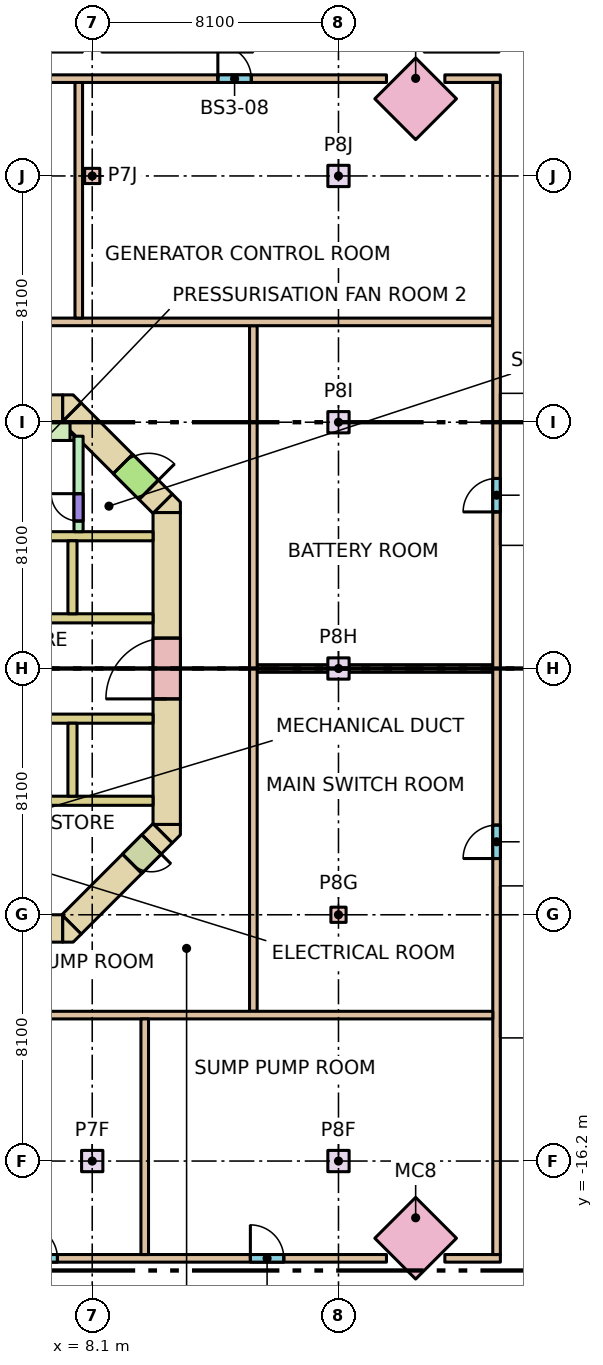
"""IFC4 building model, lengths in metres.
Left out: names, types, materials, properties, quantities, classifications, styles, units other than length and angle.
Written with IfcOpenShell. Run it as: python <this file> out.ifc"""

import sys

from ifc_helpers import new_model, si_unit, direction, frame, frame_2d, origin, origin_2d, place, context, subcontext, project, spatial, polyline, rectangle, outline, extrude, element, fill, save


model = new_model("IFC4")
c1 = context("Model", 3, precision=1e-05, world=origin(), true_north=direction((0.0, 1.0)))
c2 = subcontext(c1, "Body", "Model", "MODEL_VIEW")
j1 = project(units=[si_unit("LENGTHUNIT", "METRE"), si_unit("PLANEANGLEUNIT", "RADIAN")], contexts=[c1])
p1 = place(None, origin())
s1 = spatial("IfcSite", under=j1, at=p1, CompositionType="ELEMENT")
p2 = place(p1, origin())
s2 = spatial("IfcBuilding", under=s1, at=p2, CompositionType="ELEMENT")
p3 = place(p2, frame((0.0, 0.0, -10.8)))
s3 = spatial("IfcBuildingStorey", under=s2, at=p3, CompositionType="ELEMENT", Elevation=-10.8)
p4 = place(p3, frame((8.1, -16.2, 0.0), z_axis=(0.0, 0.0, 1.0), x_axis=(1.0, 0.0, 0.0)))
e1 = element("IfcColumn", 1, at=p4, inside=s3, PredefinedType="COLUMN", context=c2, shape_type="SweptSolid", body=[
    extrude(rectangle(XDim=0.7, YDim=0.7, at=origin_2d()), origin(), (0.0, 0.0, 1.0), 3.6),
])
p5 = place(p3, frame((8.1, 16.2, 0.0), z_axis=(0.0, 0.0, 1.0), x_axis=(1.0, 0.0, 0.0)))
e2 = element("IfcColumn", 2, at=p5, inside=s3, PredefinedType="COLUMN", context=c2, shape_type="SweptSolid", body=[
    extrude(rectangle(XDim=0.5, YDim=0.5, at=origin_2d()), origin(), (0.0, 0.0, 1.0), 3.6),
])
p6 = place(p3, frame((16.2, -16.2, 0.0), z_axis=(0.0, 0.0, 1.0), x_axis=(1.0, 0.0, 0.0)))
e3 = element("IfcColumn", 3, at=p6, inside=s3, PredefinedType="COLUMN", context=c2, shape_type="SweptSolid", body=[
    extrude(rectangle(XDim=0.7, YDim=0.7, at=origin_2d()), origin(), (0.0, 0.0, 1.0), 3.6),
])
p7 = place(p3, frame((16.2, -8.1, 0.0), z_axis=(0.0, 0.0, 1.0), x_axis=(1.0, 0.0, 0.0)))
e4 = element("IfcColumn", 4, at=p7, inside=s3, PredefinedType="COLUMN", context=c2, shape_type="SweptSolid", body=[
    extrude(rectangle(XDim=0.5, YDim=0.5, at=origin_2d()), origin(), (0.0, 0.0, 1.0), 3.6),
])
for number, where, z_axis, x_axis in (
    (5, (16.2, 0.0, 0.0), (0.0, 0.0, 1.0), (1.0, 0.0, 0.0)),
    (6, (16.2, 8.1, 0.0), (0.0, 0.0, 1.0), (1.0, 0.0, 0.0)),
    (7, (16.2, 16.2, 0.0), (0.0, 0.0, 1.0), (1.0, 0.0, 0.0)),
):
    element("IfcColumn", number, at=place(p3, frame(where, z_axis=z_axis, x_axis=x_axis)), inside=s3, PredefinedType="COLUMN", context=c2, shape_type="SweptSolid", body=[
        extrude(rectangle(XDim=0.7, YDim=0.7, at=origin_2d()), origin(), (0.0, 0.0, 1.0), 3.6),
    ])
for number, where, z_axis, x_axis in (
    (8, (18.738, 18.738, 0.0), (0.0, 0.0, 1.0), (-0.707, 0.707, 0.0)),
    (9, (18.738, -18.738, 0.0), (0.0, 0.0, 1.0), (0.707, 0.707, 0.0)),
):
    element("IfcColumn", number, at=place(p3, frame(where, z_axis=z_axis, x_axis=x_axis)), inside=s3, PredefinedType="COLUMN", context=c2, shape_type="SweptSolid", body=[
        extrude(rectangle(XDim=1.9, YDim=1.9, at=origin_2d()), origin(), (0.0, 0.0, 1.0), 3.6),
    ])
p8 = place(p3, frame((-7.13, 8.55, 0.0), z_axis=(0.0, 0.0, 1.0), x_axis=(1.0, 0.0, 0.0)))
e10 = element("IfcWall", 10, at=p8, inside=s3, PredefinedType="SHEAR", context=c2, shape_type="SweptSolid", body=[
    extrude(rectangle(XDim=14.26, YDim=0.9, at=frame_2d((7.13, 0.0))), origin(), (0.0, 0.0, 1.0), 3.28),
])
p9 = place(p8, frame((5.48, 0.0, 0.0)))
e11 = element("IfcOpeningElement", 11, at=p9, cuts=e10, PredefinedType="OPENING", context=c2, shape_type="SweptSolid", body=[
    extrude(rectangle(XDim=0.7, YDim=2.1, at=frame_2d((0.35, 1.05))), frame((0.0, 0.46, 0.0), z_axis=(0.0, -1.0, 0.0), x_axis=(1.0, 0.0, 0.0)), (0.0, 0.0, 1.0), 0.92),
])
p10 = place(p8, frame((7.155, 0.0, 0.0)))
e12 = element("IfcOpeningElement", 12, at=p10, cuts=e10, PredefinedType="OPENING", context=c2, shape_type="SweptSolid", body=[
    extrude(rectangle(XDim=0.9, YDim=2.1, at=frame_2d((0.45, 1.05))), frame((0.0, 0.46, 0.0), z_axis=(0.0, -1.0, 0.0), x_axis=(1.0, 0.0, 0.0)), (0.0, 0.0, 1.0), 0.92),
])
p11 = place(p3, frame((-7.13, -8.55, 0.0), z_axis=(0.0, 0.0, 1.0), x_axis=(1.0, 0.0, 0.0)))
e13 = element("IfcWall", 13, at=p11, inside=s3, PredefinedType="SHEAR", context=c2, shape_type="SweptSolid", body=[
    extrude(rectangle(XDim=14.26, YDim=0.9, at=frame_2d((7.13, 0.0))), origin(), (0.0, 0.0, 1.0), 3.28),
])
p12 = place(p11, frame((8.08, 0.0, 0.0)))
e14 = element("IfcOpeningElement", 14, at=p12, cuts=e13, PredefinedType="OPENING", context=c2, shape_type="SweptSolid", body=[
    extrude(rectangle(XDim=0.7, YDim=2.1, at=frame_2d((0.35, 1.05))), frame((0.0, 0.46, 0.0), z_axis=(0.0, -1.0, 0.0), x_axis=(1.0, 0.0, 0.0)), (0.0, 0.0, 1.0), 0.92),
])
p13 = place(p11, frame((6.205, 0.0, 0.0)))
e15 = element("IfcOpeningElement", 15, at=p13, cuts=e13, PredefinedType="OPENING", context=c2, shape_type="SweptSolid", body=[
    extrude(rectangle(XDim=0.9, YDim=2.1, at=frame_2d((0.45, 1.05))), frame((0.0, 0.46, 0.0), z_axis=(0.0, -1.0, 0.0), x_axis=(1.0, 0.0, 0.0)), (0.0, 0.0, 1.0), 0.92),
])
p14 = place(p11, frame((10.667, 0.0, 0.0)))
e16 = element("IfcOpeningElement", 16, at=p14, cuts=e13, PredefinedType="OPENING", context=c2, shape_type="SweptSolid", body=[
    extrude(rectangle(XDim=0.9, YDim=2.1, at=frame_2d((0.45, 1.05))), frame((0.0, 0.46, 0.0), z_axis=(0.0, -1.0, 0.0), x_axis=(1.0, 0.0, 0.0)), (0.0, 0.0, 1.0), 0.92),
])
p15 = place(p3, frame((10.55, -5.13, 0.0), z_axis=(0.0, 0.0, 1.0), x_axis=(0.0, 1.0, 0.0)))
e17 = element("IfcWall", 17, at=p15, inside=s3, PredefinedType="SHEAR", context=c2, shape_type="SweptSolid", body=[
    extrude(rectangle(XDim=10.26, YDim=0.9, at=frame_2d((5.13, 0.0))), origin(), (0.0, 0.0, 1.0), 3.28),
])
p16 = place(p15, frame((4.13, 0.0, 0.0)))
e18 = element("IfcOpeningElement", 18, at=p16, cuts=e17, PredefinedType="OPENING", context=c2, shape_type="SweptSolid", body=[
    extrude(rectangle(XDim=2.0, YDim=2.1, at=frame_2d((1.0, 1.05))), frame((0.0, 0.46, 0.0), z_axis=(0.0, -1.0, 0.0), x_axis=(1.0, 0.0, 0.0)), (0.0, 0.0, 1.0), 0.92),
])
p17 = place(p3, frame((7.418, 8.418, 0.0), z_axis=(0.0, 0.0, 1.0), x_axis=(0.707106781187, -0.707106781187, 0.0)))
e19 = element("IfcWall", 19, at=p17, inside=s3, PredefinedType="SHEAR", context=c2, shape_type="SweptSolid", body=[
    extrude(rectangle(XDim=4.243, YDim=0.9, at=frame_2d((2.121, 0.0))), origin(), (0.0, 0.0, 1.0), 3.28),
])
p18 = place(p17, frame((2.393, 0.0, 0.0)))
e20 = element("IfcOpeningElement", 20, at=p18, cuts=e19, PredefinedType="OPENING", context=c2, shape_type="SweptSolid", body=[
    extrude(rectangle(XDim=1.2, YDim=2.1, at=frame_2d((0.6, 1.05))), frame((0.0, 0.46, 0.0), z_axis=(0.0, -1.0, 0.0), x_axis=(1.0, 0.0, 0.0)), (0.0, 0.0, 1.0), 0.92),
])
p19 = place(p3, frame((10.418, -5.418, 0.0), z_axis=(0.0, 0.0, 1.0), x_axis=(-0.707106781187, -0.707106781187, 0.0)))
e21 = element("IfcWall", 21, at=p19, inside=s3, PredefinedType="SHEAR", context=c2, shape_type="SweptSolid", body=[
    extrude(rectangle(XDim=4.243, YDim=0.9, at=frame_2d((2.121, 0.0))), origin(), (0.0, 0.0, 1.0), 3.28),
])
p20 = place(p19, frame((0.52, 0.0, 0.0)))
e22 = element("IfcOpeningElement", 22, at=p20, cuts=e21, PredefinedType="OPENING", context=c2, shape_type="SweptSolid", body=[
    extrude(rectangle(XDim=0.9, YDim=2.1, at=frame_2d((0.45, 1.05))), frame((0.0, 0.46, 0.0), z_axis=(0.0, -1.0, 0.0), x_axis=(1.0, 0.0, 0.0)), (0.0, 0.0, 1.0), 0.92),
])
p21 = place(p3, origin())
e23 = element("IfcWall", 23, at=p21, inside=s3, PredefinedType="SHEAR", context=c2, shape_type="SweptSolid", body=[
    extrude(outline(polyline([(7.473, -9.0), (7.13, -9.0), (7.13, -8.13), (7.736, -8.736), (7.473, -9.0)])), origin(), (0.0, 0.0, 1.0), 3.28),
])
p22 = place(p3, origin())
e24 = element("IfcWall", 24, at=p22, inside=s3, PredefinedType="SHEAR", context=c2, shape_type="SweptSolid", body=[
    extrude(outline(polyline([(11.0, -5.473), (10.736, -5.736), (10.13, -5.13), (11.0, -5.13), (11.0, -5.473)])), origin(), (0.0, 0.0, 1.0), 3.28),
])
p23 = place(p3, origin())
e25 = element("IfcWall", 25, at=p23, inside=s3, PredefinedType="SHEAR", context=c2, shape_type="SweptSolid", body=[
    extrude(outline(polyline([(11.0, 5.473), (11.0, 5.13), (10.13, 5.13), (10.736, 5.736), (11.0, 5.473)])), origin(), (0.0, 0.0, 1.0), 3.28),
])
p24 = place(p3, origin())
e26 = element("IfcWall", 26, at=p24, inside=s3, PredefinedType="SHEAR", context=c2, shape_type="SweptSolid", body=[
    extrude(outline(polyline([(7.473, 9.0), (7.736, 8.736), (7.13, 8.13), (7.13, 9.0), (7.473, 9.0)])), origin(), (0.0, 0.0, 1.0), 3.28),
])
for number, where, z_axis, x_axis in (
    (27, (2.0, 4.35, 0.0), (0.0, 0.0, 1.0), (1.0, 0.0, 0.0)),
    (28, (2.0, -4.35, 0.0), (0.0, 0.0, 1.0), (1.0, 0.0, 0.0)),
    (29, (2.0, 1.65, 0.0), (0.0, 0.0, 1.0), (1.0, 0.0, 0.0)),
    (30, (2.0, -1.65, 0.0), (0.0, 0.0, 1.0), (1.0, 0.0, 0.0)),
):
    element("IfcWall", number, at=place(p3, frame(where, z_axis=z_axis, x_axis=x_axis)), inside=s3, PredefinedType="SOLIDWALL", context=c2, shape_type="SweptSolid", body=[
        extrude(rectangle(XDim=8.1, YDim=0.3, at=frame_2d((4.05, 0.0))), origin(), (0.0, 0.0, 1.0), 3.28),
    ])
for number, where, z_axis, x_axis in (
    (31, (7.45, 1.8, 0.0), (0.0, 0.0, 1.0), (0.0, 1.0, 0.0)),
    (32, (7.45, -4.2, 0.0), (0.0, 0.0, 1.0), (0.0, 1.0, 0.0)),
):
    element("IfcWall", number, at=place(p3, frame(where, z_axis=z_axis, x_axis=x_axis)), inside=s3, PredefinedType="SOLIDWALL", context=c2, shape_type="SweptSolid", body=[
        extrude(rectangle(XDim=2.4, YDim=0.3, at=frame_2d((1.2, 0.0))), origin(), (0.0, 0.0, 1.0), 3.28),
    ])
p25 = place(p3, frame((7.65, 4.5, 0.0), z_axis=(0.0, 0.0, 1.0), x_axis=(0.0, 1.0, 0.0)))
e33 = element("IfcWall", 33, at=p25, inside=s3, PredefinedType="SHEAR", context=c2, shape_type="SweptSolid", body=[
    extrude(rectangle(XDim=3.14, YDim=0.3, at=frame_2d((1.57, 0.0))), origin(), (0.0, 0.0, 1.0), 3.28),
])
p26 = place(p25, frame((0.35, 0.0, 0.0)))
e34 = element("IfcOpeningElement", 34, at=p26, cuts=e33, PredefinedType="OPENING", context=c2, shape_type="SweptSolid", body=[
    extrude(rectangle(XDim=0.9, YDim=2.1, at=frame_2d((0.45, 1.05))), frame((0.0, 0.16, 0.0), z_axis=(0.0, -1.0, 0.0), x_axis=(1.0, 0.0, 0.0)), (0.0, 0.0, 1.0), 0.32),
])
p27 = place(p3, frame((2.0, 7.8, 0.0), z_axis=(0.0, 0.0, 1.0), x_axis=(1.0, 0.0, 0.0)))
e35 = element("IfcWall", 35, at=p27, inside=s3, PredefinedType="SHEAR", context=c2, shape_type="SweptSolid", body=[
    extrude(rectangle(XDim=5.37, YDim=0.6, at=frame_2d((2.685, 0.0))), origin(), (0.0, 0.0, 1.0), 3.28),
])
p28 = place(p3, frame((6.9, 7.6, 0.0), z_axis=(0.0, 0.0, 1.0), x_axis=(1.0, 0.0, 0.0)))
e36 = element("IfcWall", 36, at=p28, inside=s3, PredefinedType="SHEAR", context=c2, shape_type="SweptSolid", body=[
    extrude(rectangle(XDim=0.6, YDim=0.2, at=frame_2d((0.3, 0.0))), origin(), (0.0, 0.0, 1.0), 3.28),
])
p29 = place(p3, frame((13.525, 0.0, 0.0), z_axis=(0.0, 0.0, 1.0), x_axis=(1.0, 0.0, 0.0)))
e37 = element("IfcWall", 37, at=p29, inside=s3, PredefinedType="PARTITIONING", context=c2, shape_type="SweptSolid", body=[
    extrude(rectangle(XDim=2.315, YDim=0.25, at=frame_2d((1.158, 0.0))), origin(), (0.0, 0.0, 1.0), 3.28),
])
p30 = place(p3, frame((16.56, 0.0, 0.0), z_axis=(0.0, 0.0, 1.0), x_axis=(1.0, 0.0, 0.0)))
e38 = element("IfcWall", 38, at=p30, inside=s3, PredefinedType="PARTITIONING", context=c2, shape_type="SweptSolid", body=[
    extrude(rectangle(XDim=4.715, YDim=0.25, at=frame_2d((2.357, 0.0))), origin(), (0.0, 0.0, 1.0), 3.28),
])
p31 = place(p3, frame((13.4, -11.275, 0.0), z_axis=(0.0, 0.0, 1.0), x_axis=(0.0, 1.0, 0.0)))
e39 = element("IfcWall", 39, at=p31, inside=s3, PredefinedType="PARTITIONING", context=c2, shape_type="SweptSolid", body=[
    extrude(rectangle(XDim=22.55, YDim=0.25, at=frame_2d((11.275, 0.0))), origin(), (0.0, 0.0, 1.0), 3.28),
])
p32 = place(p3, frame((-13.275, 11.4, 0.0), z_axis=(0.0, 0.0, 1.0), x_axis=(1.0, 0.0, 0.0)))
e40 = element("IfcWall", 40, at=p32, inside=s3, PredefinedType="PARTITIONING", context=c2, shape_type="SweptSolid", body=[
    extrude(rectangle(XDim=34.55, YDim=0.25, at=frame_2d((17.275, 0.0))), origin(), (0.0, 0.0, 1.0), 3.28),
])
p33 = place(p3, frame((7.657, 11.525, 0.0), z_axis=(0.0, 0.0, 1.0), x_axis=(0.0, 1.0, 0.0)))
e41 = element("IfcWall", 41, at=p33, inside=s3, PredefinedType="PARTITIONING", context=c2, shape_type="SweptSolid", body=[
    extrude(rectangle(XDim=7.75, YDim=0.25, at=frame_2d((3.875, 0.0))), origin(), (0.0, 0.0, 1.0), 3.28),
])
for number, where, z_axis, x_axis in (
    (42, (19.698, 19.4, 0.0), (0.0, 0.0, 1.0), (1.0, 0.0, 0.0)),
    (43, (19.698, -19.4, 0.0), (0.0, 0.0, 1.0), (1.0, 0.0, 0.0)),
):
    element("IfcWall", number, at=place(p3, frame(where, z_axis=z_axis, x_axis=x_axis)), inside=s3, PredefinedType="PARTITIONING", context=c2, shape_type="SweptSolid", body=[
        extrude(rectangle(XDim=1.827, YDim=0.25, at=frame_2d((0.913, 0.0))), origin(), (0.0, 0.0, 1.0), 3.28),
    ])
p34 = place(p3, frame((21.4, -19.275, 0.0), z_axis=(0.0, 0.0, 1.0), x_axis=(0.0, 1.0, 0.0)))
e44 = element("IfcWall", 44, at=p34, inside=s3, PredefinedType="PARTITIONING", context=c2, shape_type="SweptSolid", body=[
    extrude(rectangle(XDim=38.55, YDim=0.25, at=frame_2d((19.275, 0.0))), origin(), (0.0, 0.0, 1.0), 3.28),
])
p35 = place(p34, frame((13.025, 0.0, 0.0)))
e45 = element("IfcOpeningElement", 45, at=p35, cuts=e44, PredefinedType="OPENING", context=c2, shape_type="SweptSolid", body=[
    extrude(rectangle(XDim=1.1, YDim=2.1, at=frame_2d((0.55, 1.05))), frame((0.0, 0.135, 0.0), z_axis=(0.0, -1.0, 0.0), x_axis=(1.0, 0.0, 0.0)), (0.0, 0.0, 1.0), 0.27),
])
p36 = place(p34, frame((24.425, 0.0, 0.0)))
e46 = element("IfcOpeningElement", 46, at=p36, cuts=e44, PredefinedType="OPENING", context=c2, shape_type="SweptSolid", body=[
    extrude(rectangle(XDim=1.1, YDim=2.1, at=frame_2d((0.55, 1.05))), frame((0.0, 0.135, 0.0), z_axis=(0.0, -1.0, 0.0), x_axis=(1.0, 0.0, 0.0)), (0.0, 0.0, 1.0), 0.27),
])
p37 = place(p3, frame((-17.778, 19.4, 0.0), z_axis=(0.0, 0.0, 1.0), x_axis=(1.0, 0.0, 0.0)))
e47 = element("IfcWall", 47, at=p37, inside=s3, PredefinedType="PARTITIONING", context=c2, shape_type="SweptSolid", body=[
    extrude(rectangle(XDim=35.557, YDim=0.25, at=frame_2d((17.778, 0.0))), origin(), (0.0, 0.0, 1.0), 3.28),
])
p38 = place(p37, frame((7.753, 0.0, 0.0)))
e48 = element("IfcOpeningElement", 48, at=p38, cuts=e47, PredefinedType="OPENING", context=c2, shape_type="SweptSolid", body=[
    extrude(rectangle(XDim=1.1, YDim=2.1, at=frame_2d((0.55, 1.05))), frame((0.0, 0.135, 0.0), z_axis=(0.0, -1.0, 0.0), x_axis=(1.0, 0.0, 0.0)), (0.0, 0.0, 1.0), 0.27),
])
p39 = place(p37, frame((15.41, 0.0, 0.0)))
e49 = element("IfcOpeningElement", 49, at=p39, cuts=e47, PredefinedType="OPENING", context=c2, shape_type="SweptSolid", body=[
    extrude(rectangle(XDim=1.1, YDim=2.1, at=frame_2d((0.55, 1.05))), frame((0.0, 0.135, 0.0), z_axis=(0.0, -1.0, 0.0), x_axis=(1.0, 0.0, 0.0)), (0.0, 0.0, 1.0), 0.27),
])
p40 = place(p37, frame((22.167, 0.0, 0.0)))
e50 = element("IfcOpeningElement", 50, at=p40, cuts=e47, PredefinedType="OPENING", context=c2, shape_type="SweptSolid", body=[
    extrude(rectangle(XDim=1.0, YDim=2.1, at=frame_2d((0.5, 1.05))), frame((0.0, 0.135, 0.0), z_axis=(0.0, -1.0, 0.0), x_axis=(1.0, 0.0, 0.0)), (0.0, 0.0, 1.0), 0.27),
])
p41 = place(p37, frame((30.01, 0.0, 0.0)))
e51 = element("IfcOpeningElement", 51, at=p41, cuts=e47, PredefinedType="OPENING", context=c2, shape_type="SweptSolid", body=[
    extrude(rectangle(XDim=1.1, YDim=2.1, at=frame_2d((0.55, 1.05))), frame((0.0, 0.135, 0.0), z_axis=(0.0, -1.0, 0.0), x_axis=(1.0, 0.0, 0.0)), (0.0, 0.0, 1.0), 0.27),
])
p42 = place(p3, frame((-17.778, -19.4, 0.0), z_axis=(0.0, 0.0, 1.0), x_axis=(1.0, 0.0, 0.0)))
e52 = element("IfcWall", 52, at=p42, inside=s3, PredefinedType="PARTITIONING", context=c2, shape_type="SweptSolid", body=[
    extrude(rectangle(XDim=35.557, YDim=0.25, at=frame_2d((17.778, 0.0))), origin(), (0.0, 0.0, 1.0), 3.28),
])
p43 = place(p42, frame((9.353, 0.0, 0.0)))
e53 = element("IfcOpeningElement", 53, at=p43, cuts=e52, PredefinedType="OPENING", context=c2, shape_type="SweptSolid", body=[
    extrude(rectangle(XDim=1.1, YDim=2.1, at=frame_2d((0.55, 1.05))), frame((0.0, 0.135, 0.0), z_axis=(0.0, -1.0, 0.0), x_axis=(1.0, 0.0, 0.0)), (0.0, 0.0, 1.0), 0.27),
])
p44 = place(p42, frame((17.373, 0.0, 0.0)))
e54 = element("IfcOpeningElement", 54, at=p44, cuts=e52, PredefinedType="OPENING", context=c2, shape_type="SweptSolid", body=[
    extrude(rectangle(XDim=1.1, YDim=2.1, at=frame_2d((0.55, 1.05))), frame((0.0, 0.135, 0.0), z_axis=(0.0, -1.0, 0.0), x_axis=(1.0, 0.0, 0.0)), (0.0, 0.0, 1.0), 0.27),
])
p45 = place(p42, frame((23.633, 0.0, 0.0)))
e55 = element("IfcOpeningElement", 55, at=p45, cuts=e52, PredefinedType="OPENING", context=c2, shape_type="SweptSolid", body=[
    extrude(rectangle(XDim=1.1, YDim=2.1, at=frame_2d((0.55, 1.05))), frame((0.0, 0.135, 0.0), z_axis=(0.0, -1.0, 0.0), x_axis=(1.0, 0.0, 0.0)), (0.0, 0.0, 1.0), 0.27),
])
p46 = place(p42, frame((31.08, 0.0, 0.0)))
e56 = element("IfcOpeningElement", 56, at=p46, cuts=e52, PredefinedType="OPENING", context=c2, shape_type="SweptSolid", body=[
    extrude(rectangle(XDim=1.1, YDim=2.1, at=frame_2d((0.55, 1.05))), frame((0.0, 0.135, 0.0), z_axis=(0.0, -1.0, 0.0), x_axis=(1.0, 0.0, 0.0)), (0.0, 0.0, 1.0), 0.27),
])
p47 = place(p3, frame((-13.275, -11.4, 0.0), z_axis=(0.0, 0.0, 1.0), x_axis=(1.0, 0.0, 0.0)))
e57 = element("IfcWall", 57, at=p47, inside=s3, PredefinedType="PARTITIONING", context=c2, shape_type="SweptSolid", body=[
    extrude(rectangle(XDim=34.55, YDim=0.25, at=frame_2d((17.275, 0.0))), origin(), (0.0, 0.0, 1.0), 3.28),
])
p48 = place(p3, frame((9.827, -19.275, 0.0), z_axis=(0.0, 0.0, 1.0), x_axis=(0.0, 1.0, 0.0)))
e58 = element("IfcWall", 58, at=p48, inside=s3, PredefinedType="PARTITIONING", context=c2, shape_type="SweptSolid", body=[
    extrude(rectangle(XDim=7.75, YDim=0.25, at=frame_2d((3.875, 0.0))), origin(), (0.0, 0.0, 1.0), 3.28),
])
p49 = place(p26, origin())
e59 = element("IfcDoor", 59, at=p49, inside=s3, OperationType="SINGLE_SWING_RIGHT", PredefinedType="DOOR", context=c2, shape_type="SweptSolid", body=[
    extrude(rectangle(XDim=0.9, YDim=2.1, at=frame_2d((0.45, 1.05))), frame((0.0, 0.025, 0.0), z_axis=(0.0, -1.0, 0.0), x_axis=(1.0, 0.0, 0.0)), (0.0, 0.0, 1.0), 0.05),
])
fill(e34, e59)
p50 = place(p18, origin())
e60 = element("IfcDoor", 60, at=p50, inside=s3, OperationType="SINGLE_SWING_RIGHT", PredefinedType="DOOR", context=c2, shape_type="SweptSolid", body=[
    extrude(rectangle(XDim=1.2, YDim=2.1, at=frame_2d((0.6, 1.05))), frame((0.0, 0.025, 0.0), z_axis=(0.0, -1.0, 0.0), x_axis=(1.0, 0.0, 0.0)), (0.0, 0.0, 1.0), 0.05),
])
fill(e20, e60)
p51 = place(p16, origin())
e61 = element("IfcDoor", 61, at=p51, inside=s3, OperationType="DOUBLE_DOOR_SINGLE_SWING", PredefinedType="DOOR", context=c2, shape_type="SweptSolid", body=[
    extrude(rectangle(XDim=2.0, YDim=2.1, at=frame_2d((1.0, 1.05))), frame((0.0, 0.025, 0.0), z_axis=(0.0, -1.0, 0.0), x_axis=(1.0, 0.0, 0.0)), (0.0, 0.0, 1.0), 0.05),
])
fill(e18, e61)
p52 = place(p20, origin())
e62 = element("IfcDoor", 62, at=p52, inside=s3, OperationType="SINGLE_SWING_LEFT", PredefinedType="DOOR", context=c2, shape_type="SweptSolid", body=[
    extrude(rectangle(XDim=0.9, YDim=2.1, at=frame_2d((0.45, 1.05))), frame((0.0, 0.025, 0.0), z_axis=(0.0, -1.0, 0.0), x_axis=(1.0, 0.0, 0.0)), (0.0, 0.0, 1.0), 0.05),
])
fill(e22, e62)
p53 = place(p41, origin())
e63 = element("IfcDoor", 63, at=p53, inside=s3, OperationType="SINGLE_SWING_LEFT", PredefinedType="DOOR", context=c2, shape_type="SweptSolid", body=[
    extrude(rectangle(XDim=1.1, YDim=2.1, at=frame_2d((0.55, 1.05))), frame((0.0, 0.025, 0.0), z_axis=(0.0, -1.0, 0.0), x_axis=(1.0, 0.0, 0.0)), (0.0, 0.0, 1.0), 0.05),
])
fill(e51, e63)
p54 = place(p45, origin())
e64 = element("IfcDoor", 64, at=p54, inside=s3, OperationType="SINGLE_SWING_LEFT", PredefinedType="DOOR", context=c2, shape_type="SweptSolid", body=[
    extrude(rectangle(XDim=1.1, YDim=2.1, at=frame_2d((0.55, 1.05))), frame((0.0, 0.025, 0.0), z_axis=(0.0, -1.0, 0.0), x_axis=(1.0, 0.0, 0.0)), (0.0, 0.0, 1.0), 0.05),
])
fill(e55, e64)
p55 = place(p46, origin())
e65 = element("IfcDoor", 65, at=p55, inside=s3, OperationType="SINGLE_SWING_LEFT", PredefinedType="DOOR", context=c2, shape_type="SweptSolid", body=[
    extrude(rectangle(XDim=1.1, YDim=2.1, at=frame_2d((0.55, 1.05))), frame((0.0, 0.025, 0.0), z_axis=(0.0, -1.0, 0.0), x_axis=(1.0, 0.0, 0.0)), (0.0, 0.0, 1.0), 0.05),
])
fill(e56, e65)
p56 = place(p35, origin())
e66 = element("IfcDoor", 66, at=p56, inside=s3, OperationType="SINGLE_SWING_LEFT", PredefinedType="DOOR", context=c2, shape_type="SweptSolid", body=[
    extrude(rectangle(XDim=1.1, YDim=2.1, at=frame_2d((0.55, 1.05))), frame((0.0, 0.025, 0.0), z_axis=(0.0, -1.0, 0.0), x_axis=(1.0, 0.0, 0.0)), (0.0, 0.0, 1.0), 0.05),
])
fill(e45, e66)
p57 = place(p36, origin())
e67 = element("IfcDoor", 67, at=p57, inside=s3, OperationType="SINGLE_SWING_LEFT", PredefinedType="DOOR", context=c2, shape_type="SweptSolid", body=[
    extrude(rectangle(XDim=1.1, YDim=2.1, at=frame_2d((0.55, 1.05))), frame((0.0, 0.025, 0.0), z_axis=(0.0, -1.0, 0.0), x_axis=(1.0, 0.0, 0.0)), (0.0, 0.0, 1.0), 0.05),
])
fill(e46, e67)
save(model, sys.argv[1])
